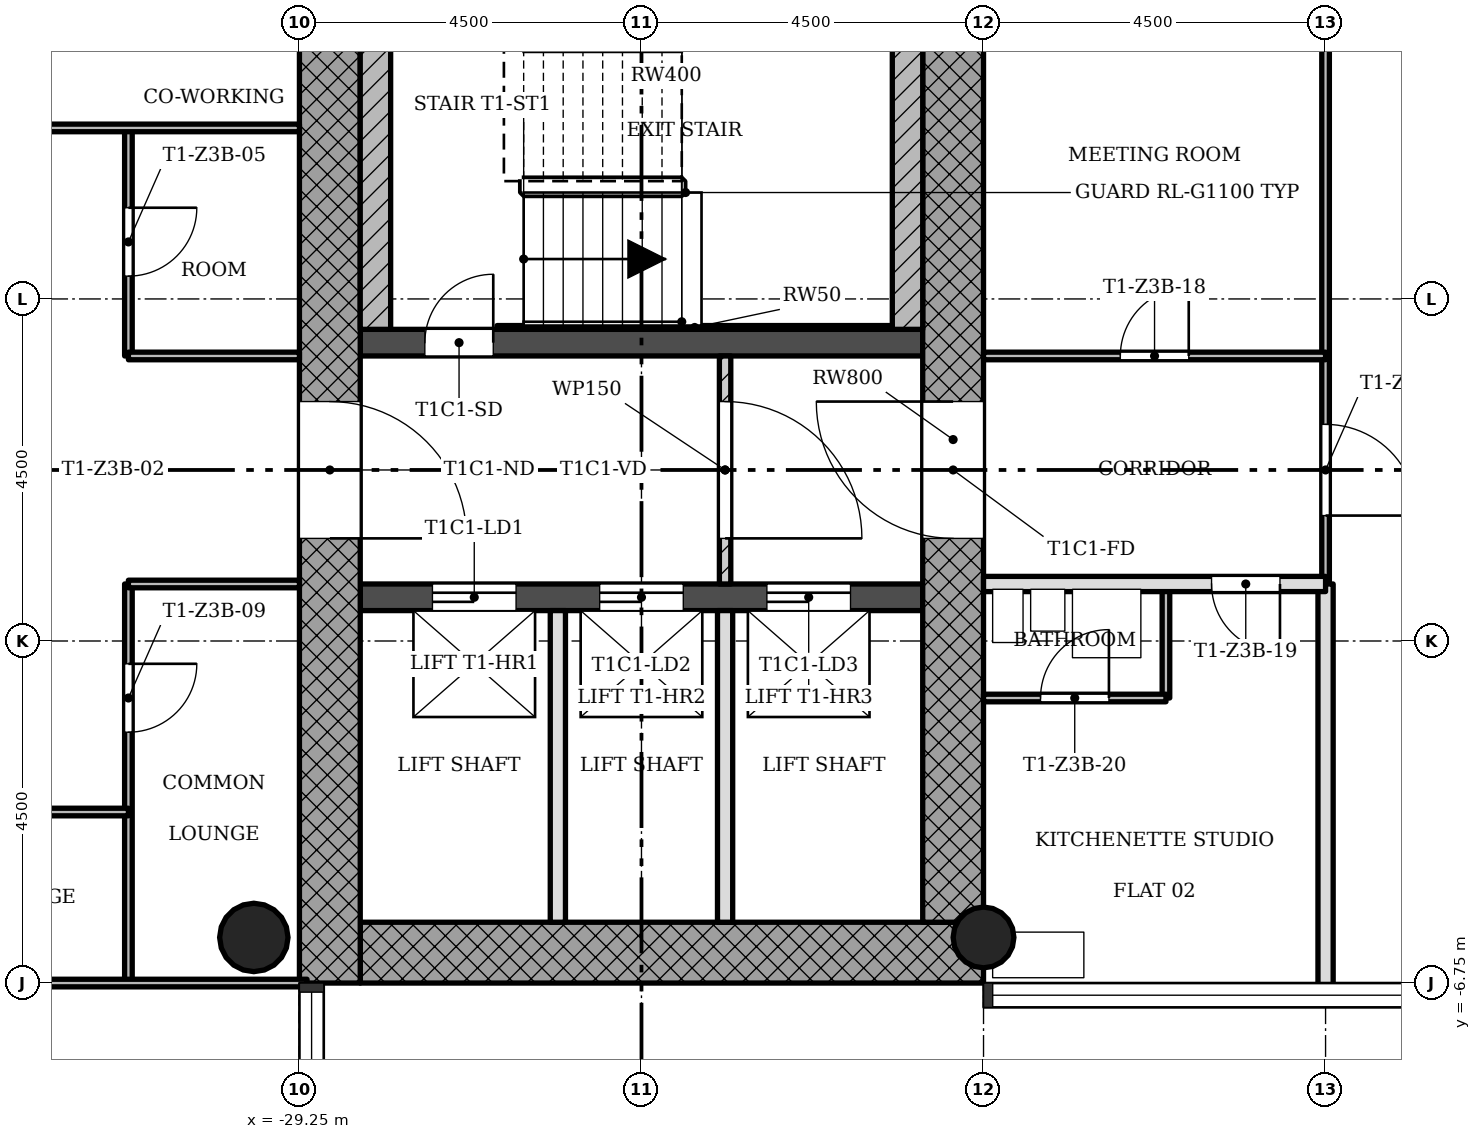
"""IFC4 building model, lengths in metres.
Left out: names, types, materials, properties, quantities, classifications, styles, units other than length and angle.
Written with IfcOpenShell. Run it as: python <this file> out.ifc"""

import sys

from ifc_helpers import new_model, si_unit, direction, frame, frame_2d, origin, origin_2d, place, context, subcontext, project, spatial, rectangle, hollow_circle, extrude, element, fill, save


model = new_model("IFC4")
c1 = context("Model", 3, precision=1e-05, world=origin(), true_north=direction((0.0, 1.0)))
c2 = subcontext(c1, "Body", "Model", "MODEL_VIEW")
j1 = project(units=[si_unit("LENGTHUNIT", "METRE"), si_unit("PLANEANGLEUNIT", "RADIAN")], contexts=[c1])
p1 = place(None, origin())
s1 = spatial("IfcSite", under=j1, at=p1, CompositionType="ELEMENT")
p2 = place(p1, origin())
s2 = spatial("IfcBuilding", under=s1, at=p2, CompositionType="ELEMENT")
p3 = place(p2, frame((0.0, 0.0, 147.3)))
s3 = spatial("IfcBuildingStorey", under=s2, at=p3, CompositionType="ELEMENT", Elevation=147.3)
p4 = place(p3, frame((-28.45, -6.35, 0.0), z_axis=(0.0, 0.0, 1.0), x_axis=(1.0, 0.0, 0.0)))
e1 = element("IfcWall", 1, at=p4, inside=s3, PredefinedType="SHEAR", context=c2, shape_type="SweptSolid", body=[
    extrude(rectangle(XDim=8.2, YDim=0.8, at=frame_2d((4.1, 0.0))), origin(), (0.0, 0.0, 1.0), 3.4),
])
p5 = place(p3, frame((-20.65, -5.95, 0.0), z_axis=(0.0, 0.0, 1.0), x_axis=(0.0, 1.0, 0.0)))
e2 = element("IfcWall", 2, at=p5, inside=s3, PredefinedType="SHEAR", context=c2, shape_type="SweptSolid", body=[
    extrude(rectangle(XDim=12.7, YDim=0.8, at=frame_2d((6.35, 0.0))), origin(), (0.0, 0.0, 1.0), 3.4),
])
p6 = place(p5, frame((5.05, 0.0, 0.0)))
e3 = element("IfcOpeningElement", 3, at=p6, cuts=e2, PredefinedType="OPENING", context=c2, shape_type="SweptSolid", body=[
    extrude(rectangle(XDim=1.8, YDim=2.1, at=frame_2d((0.9, 1.05))), frame((0.0, 0.41, 0.0), z_axis=(0.0, -1.0, 0.0), x_axis=(1.0, 0.0, 0.0)), (0.0, 0.0, 1.0), 0.82),
])
p7 = place(p3, frame((-28.85, 5.95, 0.0), z_axis=(0.0, 0.0, 1.0), x_axis=(0.0, -1.0, 0.0)))
e4 = element("IfcWall", 4, at=p7, inside=s3, PredefinedType="SHEAR", context=c2, shape_type="SweptSolid", body=[
    extrude(rectangle(XDim=12.7, YDim=0.8, at=frame_2d((6.35, 0.0))), origin(), (0.0, 0.0, 1.0), 3.4),
])
p8 = place(p7, frame((5.05, 0.0, 0.0)))
e5 = element("IfcOpeningElement", 5, at=p8, cuts=e4, PredefinedType="OPENING", context=c2, shape_type="SweptSolid", body=[
    extrude(rectangle(XDim=1.8, YDim=2.1, at=frame_2d((0.9, 1.05))), frame((0.0, 0.41, 0.0), z_axis=(0.0, -1.0, 0.0), x_axis=(1.0, 0.0, 0.0)), (0.0, 0.0, 1.0), 0.82),
])
p9 = place(p3, frame((-28.45, -1.675, 0.0), z_axis=(0.0, 0.0, 1.0), x_axis=(1.0, 0.0, 0.0)))
e6 = element("IfcWall", 6, at=p9, inside=s3, PredefinedType="SHEAR", context=c2, shape_type="SweptSolid", body=[
    extrude(rectangle(XDim=7.4, YDim=0.35, at=frame_2d((3.7, 0.0))), origin(), (0.0, 0.0, 1.0), 3.4),
])
p10 = place(p9, frame((0.95, 0.0, 0.0)))
e7 = element("IfcOpeningElement", 7, at=p10, cuts=e6, PredefinedType="OPENING", context=c2, shape_type="SweptSolid", body=[
    extrude(rectangle(XDim=1.1, YDim=2.1, at=frame_2d((0.55, 1.05))), frame((0.0, 0.185, 0.0), z_axis=(0.0, -1.0, 0.0), x_axis=(1.0, 0.0, 0.0)), (0.0, 0.0, 1.0), 0.37),
])
p11 = place(p9, frame((3.15, 0.0, 0.0)))
e8 = element("IfcOpeningElement", 8, at=p11, cuts=e6, PredefinedType="OPENING", context=c2, shape_type="SweptSolid", body=[
    extrude(rectangle(XDim=1.1, YDim=2.1, at=frame_2d((0.55, 1.05))), frame((0.0, 0.185, 0.0), z_axis=(0.0, -1.0, 0.0), x_axis=(1.0, 0.0, 0.0)), (0.0, 0.0, 1.0), 0.37),
])
p12 = place(p9, frame((5.35, 0.0, 0.0)))
e9 = element("IfcOpeningElement", 9, at=p12, cuts=e6, PredefinedType="OPENING", context=c2, shape_type="SweptSolid", body=[
    extrude(rectangle(XDim=1.1, YDim=2.1, at=frame_2d((0.55, 1.05))), frame((0.0, 0.185, 0.0), z_axis=(0.0, -1.0, 0.0), x_axis=(1.0, 0.0, 0.0)), (0.0, 0.0, 1.0), 0.37),
])
p13 = place(p3, frame((-28.45, 1.675, 0.0), z_axis=(0.0, 0.0, 1.0), x_axis=(1.0, 0.0, 0.0)))
e10 = element("IfcWall", 10, at=p13, inside=s3, PredefinedType="SHEAR", context=c2, shape_type="SweptSolid", body=[
    extrude(rectangle(XDim=7.4, YDim=0.35, at=frame_2d((3.7, 0.0))), origin(), (0.0, 0.0, 1.0), 3.4),
])
p14 = place(p13, frame((0.85, 0.0, 0.0)))
e11 = element("IfcOpeningElement", 11, at=p14, cuts=e10, PredefinedType="OPENING", context=c2, shape_type="SweptSolid", body=[
    extrude(rectangle(XDim=0.9, YDim=2.1, at=frame_2d((0.45, 1.05))), frame((0.0, 0.185, 0.0), z_axis=(0.0, -1.0, 0.0), x_axis=(1.0, 0.0, 0.0)), (0.0, 0.0, 1.0), 0.37),
])
p15 = place(p3, frame((-20.25, -6.15, 0.0), z_axis=(0.0, 0.0, 1.0), x_axis=(1.0, 0.0, 0.0)))
e12 = element("IfcColumn", 12, at=p15, inside=s3, PredefinedType="COLUMN", context=c2, shape_type="SweptSolid", body=[
    extrude(hollow_circle(Radius=0.4, WallThickness=0.028, at=origin_2d()), origin(), (0.0, 0.0, 1.0), 3.4),
])
p16 = place(p3, frame((-29.85, -6.15, 0.0), z_axis=(0.0, 0.0, 1.0), x_axis=(1.0, 0.0, 0.0)))
e13 = element("IfcColumn", 13, at=p16, inside=s3, PredefinedType="COLUMN", context=c2, shape_type="SweptSolid", body=[
    extrude(hollow_circle(Radius=0.45, WallThickness=0.032, at=origin_2d()), origin(), (0.0, 0.0, 1.0), 3.4),
])
p17 = place(p3, frame((-23.65, -1.5, 0.0), z_axis=(0.0, 0.0, 1.0), x_axis=(0.0, 1.0, 0.0)))
e14 = element("IfcWall", 14, at=p17, inside=s3, PredefinedType="PARTITIONING", context=c2, shape_type="SweptSolid", body=[
    extrude(rectangle(XDim=3.0, YDim=0.15, at=frame_2d((1.5, 0.0))), origin(), (0.0, 0.0, 1.0), 3.0),
])
p18 = place(p17, frame((0.6, 0.0, 0.0)))
e15 = element("IfcOpeningElement", 15, at=p18, cuts=e14, PredefinedType="OPENING", context=c2, shape_type="SweptSolid", body=[
    extrude(rectangle(XDim=1.8, YDim=2.1, at=frame_2d((0.9, 1.05))), frame((0.0, 0.085, 0.0), z_axis=(0.0, -1.0, 0.0), x_axis=(1.0, 0.0, 0.0)), (0.0, 0.0, 1.0), 0.17),
])
for number, where, z_axis, x_axis in (
    (16, (-25.85, -5.95, 0.0), (0.0, 0.0, 1.0), (0.0, 1.0, 0.0)),
    (17, (-23.65, -5.95, 0.0), (0.0, 0.0, 1.0), (0.0, 1.0, 0.0)),
):
    element("IfcWall", number, at=place(p3, frame(where, z_axis=z_axis, x_axis=x_axis)), inside=s3, PredefinedType="SOLIDWALL", context=c2, shape_type="SweptSolid", body=[
        extrude(rectangle(XDim=4.1, YDim=0.2, at=frame_2d((2.05, 0.0))), origin(), (0.0, 0.0, 1.0), 3.0),
    ])
p19 = place(p3, frame((-31.5, -6.75, 0.0), z_axis=(0.0, 0.0, 1.0), x_axis=(0.0, 1.0, 0.0)))
e18 = element("IfcWall", 18, at=p19, inside=s3, PredefinedType="PARTITIONING", context=c2, shape_type="SweptSolid", body=[
    extrude(rectangle(XDim=5.25, YDim=0.1, at=frame_2d((2.625, 0.0))), origin(), (0.0, 0.0, 1.0), 3.0),
])
p20 = place(p19, frame((3.3, 0.0, 0.0)))
e19 = element("IfcOpeningElement", 19, at=p20, cuts=e18, PredefinedType="OPENING", context=c2, shape_type="SweptSolid", body=[
    extrude(rectangle(XDim=0.9, YDim=2.1, at=frame_2d((0.45, 1.05))), frame((0.0, 0.06, 0.0), z_axis=(0.0, -1.0, 0.0), x_axis=(1.0, 0.0, 0.0)), (0.0, 0.0, 1.0), 0.12),
])
p21 = place(p3, frame((-31.5, 1.5, 0.0), z_axis=(0.0, 0.0, 1.0), x_axis=(0.0, 1.0, 0.0)))
e20 = element("IfcWall", 20, at=p21, inside=s3, PredefinedType="PARTITIONING", context=c2, shape_type="SweptSolid", body=[
    extrude(rectangle(XDim=3.0, YDim=0.1, at=frame_2d((1.5, 0.0))), origin(), (0.0, 0.0, 1.0), 3.0),
])
p22 = place(p21, frame((1.05, 0.0, 0.0)))
e21 = element("IfcOpeningElement", 21, at=p22, cuts=e20, PredefinedType="OPENING", context=c2, shape_type="SweptSolid", body=[
    extrude(rectangle(XDim=0.9, YDim=2.1, at=frame_2d((0.45, 1.05))), frame((0.0, 0.06, 0.0), z_axis=(0.0, -1.0, 0.0), x_axis=(1.0, 0.0, 0.0)), (0.0, 0.0, 1.0), 0.12),
])
p23 = place(p3, frame((-17.85, -3.0, 0.0), z_axis=(0.0, 0.0, 1.0), x_axis=(0.0, 1.0, 0.0)))
e22 = element("IfcWall", 22, at=p23, inside=s3, PredefinedType="PARTITIONING", context=c2, shape_type="SweptSolid", body=[
    extrude(rectangle(XDim=1.5, YDim=0.1, at=frame_2d((0.75, 0.0))), origin(), (0.0, 0.0, 1.0), 3.0),
])
p24 = place(p3, frame((-15.75, -1.5, 0.0), z_axis=(0.0, 0.0, 1.0), x_axis=(0.0, 1.0, 0.0)))
e23 = element("IfcWall", 23, at=p24, inside=s3, PredefinedType="PARTITIONING", context=c2, shape_type="SweptSolid", body=[
    extrude(rectangle(XDim=8.35, YDim=0.1, at=frame_2d((4.175, 0.0))), origin(), (0.0, 0.0, 1.0), 3.0),
])
p25 = place(p24, frame((0.9, 0.0, 0.0)))
e24 = element("IfcOpeningElement", 24, at=p25, cuts=e23, PredefinedType="OPENING", context=c2, shape_type="SweptSolid", body=[
    extrude(rectangle(XDim=1.2, YDim=2.1, at=frame_2d((0.6, 1.05))), frame((0.0, 0.06, 0.0), z_axis=(0.0, -1.0, 0.0), x_axis=(1.0, 0.0, 0.0)), (0.0, 0.0, 1.0), 0.12),
])
p26 = place(p3, frame((-15.75, -6.85, 0.0), z_axis=(0.0, 0.0, 1.0), x_axis=(0.0, 1.0, 0.0)))
e25 = element("IfcWall", 25, at=p26, inside=s3, PredefinedType="SOLIDWALL", context=c2, shape_type="SweptSolid", body=[
    extrude(rectangle(XDim=5.35, YDim=0.2, at=frame_2d((2.675, 0.0))), origin(), (0.0, 0.0, 1.0), 3.0),
])
p27 = place(p3, frame((-35.1, -6.75, 0.0), z_axis=(0.0, 0.0, 1.0), x_axis=(1.0, 0.0, 0.0)))
e26 = element("IfcWall", 26, at=p27, inside=s3, PredefinedType="PARTITIONING", context=c2, shape_type="SweptSolid", body=[
    extrude(rectangle(XDim=5.95, YDim=0.1, at=frame_2d((2.975, 0.0))), origin(), (0.0, 0.0, 1.0), 3.0),
])
p28 = place(p3, frame((-35.1, -4.5, 0.0), z_axis=(0.0, 0.0, 1.0), x_axis=(1.0, 0.0, 0.0)))
e27 = element("IfcWall", 27, at=p28, inside=s3, PredefinedType="PARTITIONING", context=c2, shape_type="SweptSolid", body=[
    extrude(rectangle(XDim=3.6, YDim=0.1, at=frame_2d((1.8, 0.0))), origin(), (0.0, 0.0, 1.0), 3.0),
])
p29 = place(p28, frame((1.35, 0.0, 0.0)))
e28 = element("IfcOpeningElement", 28, at=p29, cuts=e27, PredefinedType="OPENING", context=c2, shape_type="SweptSolid", body=[
    extrude(rectangle(XDim=0.9, YDim=2.1, at=frame_2d((0.45, 1.05))), frame((0.0, 0.06, 0.0), z_axis=(0.0, -1.0, 0.0), x_axis=(1.0, 0.0, 0.0)), (0.0, 0.0, 1.0), 0.12),
])
p30 = place(p3, frame((-20.25, -3.0, 0.0), z_axis=(0.0, 0.0, 1.0), x_axis=(1.0, 0.0, 0.0)))
e29 = element("IfcWall", 29, at=p30, inside=s3, PredefinedType="PARTITIONING", context=c2, shape_type="SweptSolid", body=[
    extrude(rectangle(XDim=2.4, YDim=0.1, at=frame_2d((1.2, 0.0))), origin(), (0.0, 0.0, 1.0), 3.0),
])
p31 = place(p30, frame((0.75, 0.0, 0.0)))
e30 = element("IfcOpeningElement", 30, at=p31, cuts=e29, PredefinedType="OPENING", context=c2, shape_type="SweptSolid", body=[
    extrude(rectangle(XDim=0.9, YDim=2.1, at=frame_2d((0.45, 1.05))), frame((0.0, 0.06, 0.0), z_axis=(0.0, -1.0, 0.0), x_axis=(1.0, 0.0, 0.0)), (0.0, 0.0, 1.0), 0.12),
])
p32 = place(p3, frame((-31.5, -1.5, 0.0), z_axis=(0.0, 0.0, 1.0), x_axis=(1.0, 0.0, 0.0)))
e31 = element("IfcWall", 31, at=p32, inside=s3, PredefinedType="PARTITIONING", context=c2, shape_type="SweptSolid", body=[
    extrude(rectangle(XDim=2.25, YDim=0.1, at=frame_2d((1.125, 0.0))), origin(), (0.0, 0.0, 1.0), 3.0),
])
p33 = place(p3, frame((-20.25, -1.5, 0.0), z_axis=(0.0, 0.0, 1.0), x_axis=(1.0, 0.0, 0.0)))
e32 = element("IfcWall", 32, at=p33, inside=s3, PredefinedType="SOLIDWALL", context=c2, shape_type="SweptSolid", body=[
    extrude(rectangle(XDim=4.5, YDim=0.2, at=frame_2d((2.25, 0.0))), origin(), (0.0, 0.0, 1.0), 3.0),
])
p34 = place(p33, frame((3.0, 0.0, 0.0)))
e33 = element("IfcOpeningElement", 33, at=p34, cuts=e32, PredefinedType="OPENING", context=c2, shape_type="SweptSolid", body=[
    extrude(rectangle(XDim=0.9, YDim=2.1, at=frame_2d((0.45, 1.05))), frame((0.0, 0.11, 0.0), z_axis=(0.0, -1.0, 0.0), x_axis=(1.0, 0.0, 0.0)), (0.0, 0.0, 1.0), 0.22),
])
p35 = place(p3, frame((-31.5, 1.5, 0.0), z_axis=(0.0, 0.0, 1.0), x_axis=(1.0, 0.0, 0.0)))
e34 = element("IfcWall", 34, at=p35, inside=s3, PredefinedType="PARTITIONING", context=c2, shape_type="SweptSolid", body=[
    extrude(rectangle(XDim=2.25, YDim=0.1, at=frame_2d((1.125, 0.0))), origin(), (0.0, 0.0, 1.0), 3.0),
])
p36 = place(p3, frame((-20.25, 1.5, 0.0), z_axis=(0.0, 0.0, 1.0), x_axis=(1.0, 0.0, 0.0)))
e35 = element("IfcWall", 35, at=p36, inside=s3, PredefinedType="PARTITIONING", context=c2, shape_type="SweptSolid", body=[
    extrude(rectangle(XDim=4.5, YDim=0.1, at=frame_2d((2.25, 0.0))), origin(), (0.0, 0.0, 1.0), 3.0),
])
p37 = place(p36, frame((1.8, 0.0, 0.0)))
e36 = element("IfcOpeningElement", 36, at=p37, cuts=e35, PredefinedType="OPENING", context=c2, shape_type="SweptSolid", body=[
    extrude(rectangle(XDim=0.9, YDim=2.1, at=frame_2d((0.45, 1.05))), frame((0.0, 0.06, 0.0), z_axis=(0.0, -1.0, 0.0), x_axis=(1.0, 0.0, 0.0)), (0.0, 0.0, 1.0), 0.12),
])
p38 = place(p3, frame((-35.1, 4.5, 0.0), z_axis=(0.0, 0.0, 1.0), x_axis=(1.0, 0.0, 0.0)))
e37 = element("IfcWall", 37, at=p38, inside=s3, PredefinedType="PARTITIONING", context=c2, shape_type="SweptSolid", body=[
    extrude(rectangle(XDim=5.85, YDim=0.1, at=frame_2d((2.925, 0.0))), origin(), (0.0, 0.0, 1.0), 3.0),
])
p39 = place(p38, frame((1.35, 0.0, 0.0)))
e38 = element("IfcOpeningElement", 38, at=p39, cuts=e37, PredefinedType="OPENING", context=c2, shape_type="SweptSolid", body=[
    extrude(rectangle(XDim=0.9, YDim=2.1, at=frame_2d((0.45, 1.05))), frame((0.0, 0.06, 0.0), z_axis=(0.0, -1.0, 0.0), x_axis=(1.0, 0.0, 0.0)), (0.0, 0.0, 1.0), 0.12),
])
for number, where, z_axis, x_axis in (
    (39, (-21.25, 1.85, 0.0), (0.0, 0.0, 1.0), (0.0, 1.0, 0.0)),
    (40, (-28.25, 1.85, 0.0), (0.0, 0.0, 1.0), (0.0, 1.0, 0.0)),
):
    element("IfcWall", number, at=place(p3, frame(where, z_axis=z_axis, x_axis=x_axis)), inside=s3, PredefinedType="SHEAR", context=c2, shape_type="SweptSolid", body=[
        extrude(rectangle(XDim=4.1, YDim=0.4, at=frame_2d((2.05, 0.0))), origin(), (0.0, 0.0, 1.0), 3.4),
    ])
p40 = place(p3, frame((-26.65, 1.875, 0.0), z_axis=(0.0, 0.0, 1.0), x_axis=(1.0, 0.0, 0.0)))
e41 = element("IfcWall", 41, at=p40, inside=s3, PredefinedType="SHEAR", context=c2, shape_type="SweptSolid", body=[
    extrude(rectangle(XDim=5.2, YDim=0.05, at=frame_2d((2.6, 0.0))), origin(), (0.0, 0.0, 1.0), 3.4),
])
p41 = place(p18, origin())
e42 = element("IfcDoor", 42, at=p41, inside=s3, OperationType="SINGLE_SWING_LEFT", PredefinedType="DOOR", context=c2, shape_type="SweptSolid", body=[
    extrude(rectangle(XDim=1.8, YDim=2.1, at=frame_2d((0.9, 1.05))), frame((0.0, 0.025, 0.0), z_axis=(0.0, -1.0, 0.0), x_axis=(1.0, 0.0, 0.0)), (0.0, 0.0, 1.0), 0.05),
])
fill(e15, e42)
p42 = place(p22, origin())
e43 = element("IfcDoor", 43, at=p42, inside=s3, OperationType="SINGLE_SWING_RIGHT", PredefinedType="DOOR", context=c2, shape_type="SweptSolid", body=[
    extrude(rectangle(XDim=0.9, YDim=2.1, at=frame_2d((0.45, 1.05))), frame((0.0, 0.025, 0.0), z_axis=(0.0, -1.0, 0.0), x_axis=(1.0, 0.0, 0.0)), (0.0, 0.0, 1.0), 0.05),
])
fill(e21, e43)
p43 = place(p20, origin())
e44 = element("IfcDoor", 44, at=p43, inside=s3, OperationType="SINGLE_SWING_RIGHT", PredefinedType="DOOR", context=c2, shape_type="SweptSolid", body=[
    extrude(rectangle(XDim=0.9, YDim=2.1, at=frame_2d((0.45, 1.05))), frame((0.0, 0.025, 0.0), z_axis=(0.0, -1.0, 0.0), x_axis=(1.0, 0.0, 0.0)), (0.0, 0.0, 1.0), 0.05),
])
fill(e19, e44)
p44 = place(p37, origin())
e45 = element("IfcDoor", 45, at=p44, inside=s3, OperationType="SINGLE_SWING_LEFT", PredefinedType="DOOR", context=c2, shape_type="SweptSolid", body=[
    extrude(rectangle(XDim=0.9, YDim=2.1, at=frame_2d((0.45, 1.05))), frame((0.0, 0.025, 0.0), z_axis=(0.0, -1.0, 0.0), x_axis=(1.0, 0.0, 0.0)), (0.0, 0.0, 1.0), 0.05),
])
fill(e36, e45)
p45 = place(p34, origin())
e46 = element("IfcDoor", 46, at=p45, inside=s3, OperationType="SINGLE_SWING_RIGHT", PredefinedType="DOOR", context=c2, shape_type="SweptSolid", body=[
    extrude(rectangle(XDim=0.9, YDim=2.1, at=frame_2d((0.45, 1.05))), frame((0.0, 0.025, 0.0), z_axis=(0.0, -1.0, 0.0), x_axis=(1.0, 0.0, 0.0)), (0.0, 0.0, 1.0), 0.05),
])
fill(e33, e46)
p46 = place(p31, origin())
e47 = element("IfcDoor", 47, at=p46, inside=s3, OperationType="SINGLE_SWING_LEFT", PredefinedType="DOOR", context=c2, shape_type="SweptSolid", body=[
    extrude(rectangle(XDim=0.9, YDim=2.1, at=frame_2d((0.45, 1.05))), frame((0.0, 0.025, 0.0), z_axis=(0.0, -1.0, 0.0), x_axis=(1.0, 0.0, 0.0)), (0.0, 0.0, 1.0), 0.05),
])
fill(e30, e47)
p47 = place(p25, origin())
e48 = element("IfcDoor", 48, at=p47, inside=s3, OperationType="SINGLE_SWING_LEFT", PredefinedType="DOOR", context=c2, shape_type="SweptSolid", body=[
    extrude(rectangle(XDim=1.2, YDim=2.1, at=frame_2d((0.6, 1.05))), frame((0.0, 0.025, 0.0), z_axis=(0.0, -1.0, 0.0), x_axis=(1.0, 0.0, 0.0)), (0.0, 0.0, 1.0), 0.05),
])
fill(e24, e48)
p48 = place(p14, origin())
e49 = element("IfcDoor", 49, at=p48, inside=s3, OperationType="SINGLE_SWING_LEFT", PredefinedType="DOOR", context=c2, shape_type="SweptSolid", body=[
    extrude(rectangle(XDim=0.9, YDim=2.1, at=frame_2d((0.45, 1.05))), frame((0.0, 0.025, 0.0), z_axis=(0.0, -1.0, 0.0), x_axis=(1.0, 0.0, 0.0)), (0.0, 0.0, 1.0), 0.05),
])
fill(e11, e49)
p49 = place(p10, origin())
e50 = element("IfcDoor", 50, at=p49, inside=s3, OperationType="SLIDING_TO_LEFT", PredefinedType="DOOR", context=c2, shape_type="SweptSolid", body=[
    extrude(rectangle(XDim=1.1, YDim=2.1, at=frame_2d((0.55, 1.05))), frame((0.0, 0.025, 0.0), z_axis=(0.0, -1.0, 0.0), x_axis=(1.0, 0.0, 0.0)), (0.0, 0.0, 1.0), 0.05),
])
fill(e7, e50)
p50 = place(p11, origin())
e51 = element("IfcDoor", 51, at=p50, inside=s3, OperationType="SLIDING_TO_LEFT", PredefinedType="DOOR", context=c2, shape_type="SweptSolid", body=[
    extrude(rectangle(XDim=1.1, YDim=2.1, at=frame_2d((0.55, 1.05))), frame((0.0, 0.025, 0.0), z_axis=(0.0, -1.0, 0.0), x_axis=(1.0, 0.0, 0.0)), (0.0, 0.0, 1.0), 0.05),
])
fill(e8, e51)
p51 = place(p12, origin())
e52 = element("IfcDoor", 52, at=p51, inside=s3, OperationType="SLIDING_TO_LEFT", PredefinedType="DOOR", context=c2, shape_type="SweptSolid", body=[
    extrude(rectangle(XDim=1.1, YDim=2.1, at=frame_2d((0.55, 1.05))), frame((0.0, 0.025, 0.0), z_axis=(0.0, -1.0, 0.0), x_axis=(1.0, 0.0, 0.0)), (0.0, 0.0, 1.0), 0.05),
])
fill(e9, e52)
p52 = place(p8, origin())
e53 = element("IfcDoor", 53, at=p52, inside=s3, OperationType="SINGLE_SWING_LEFT", PredefinedType="DOOR", context=c2, shape_type="SweptSolid", body=[
    extrude(rectangle(XDim=1.8, YDim=2.1, at=frame_2d((0.9, 1.05))), frame((0.0, 0.025, 0.0), z_axis=(0.0, -1.0, 0.0), x_axis=(1.0, 0.0, 0.0)), (0.0, 0.0, 1.0), 0.05),
])
fill(e5, e53)
p53 = place(p6, origin())
e54 = element("IfcDoor", 54, at=p53, inside=s3, OperationType="SINGLE_SWING_LEFT", PredefinedType="DOOR", context=c2, shape_type="SweptSolid", body=[
    extrude(rectangle(XDim=1.8, YDim=2.1, at=frame_2d((0.9, 1.05))), frame((0.0, 0.025, 0.0), z_axis=(0.0, -1.0, 0.0), x_axis=(1.0, 0.0, 0.0)), (0.0, 0.0, 1.0), 0.05),
])
fill(e3, e54)
save(model, sys.argv[1])
